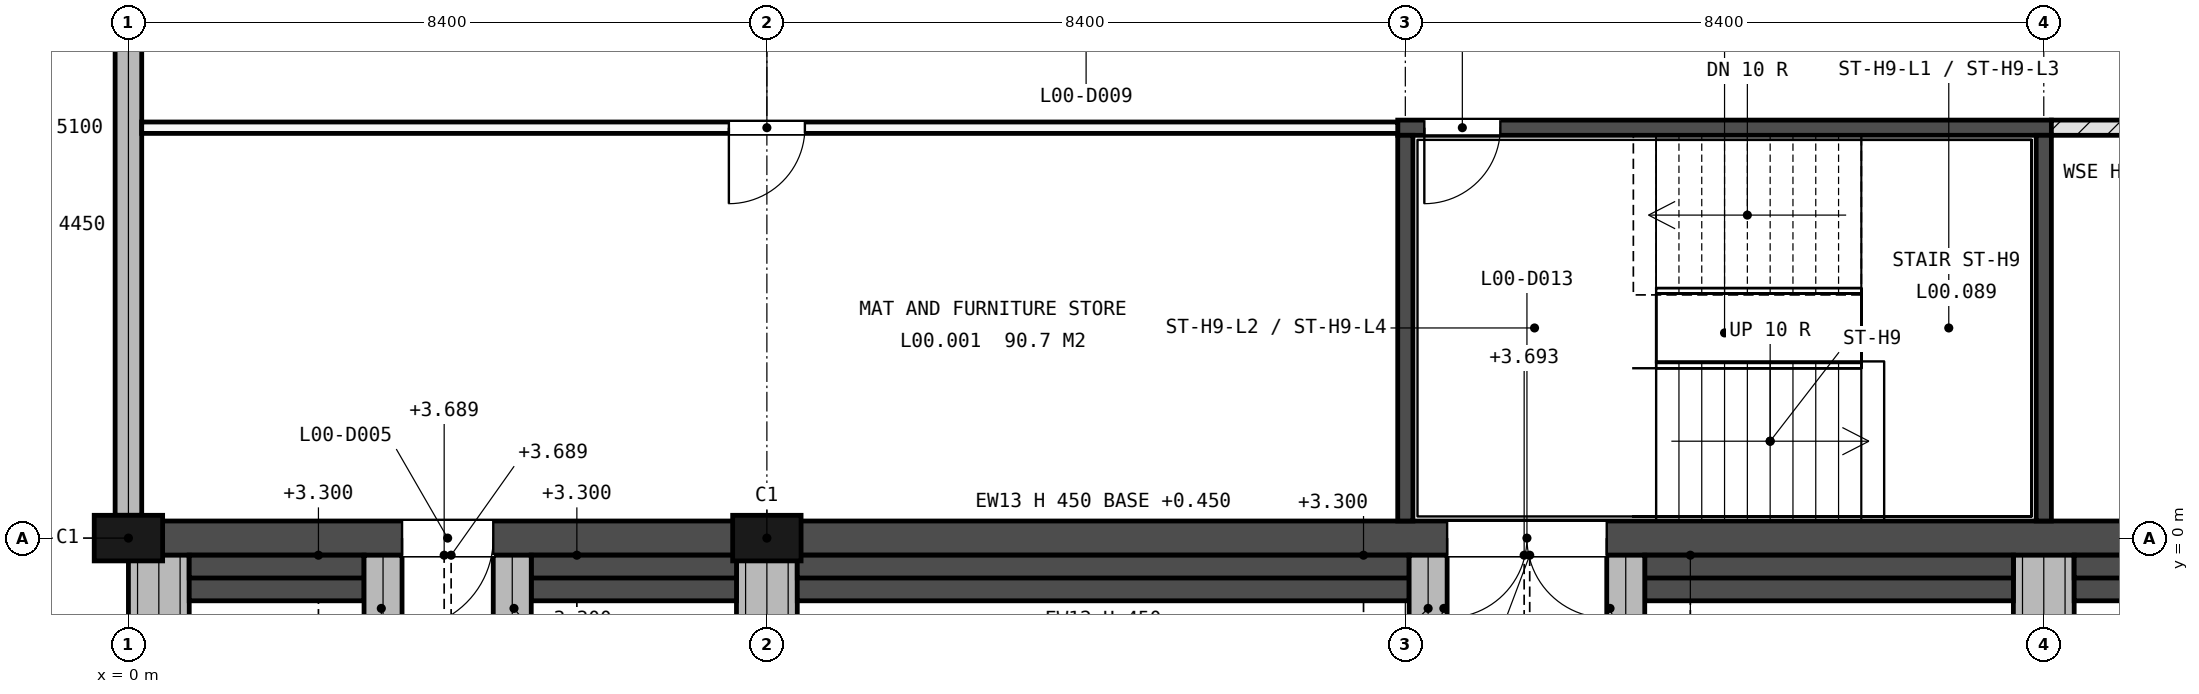
"""IFC4 building model, lengths in metres.
Left out: names, types, materials, properties, quantities, classifications, styles, units other than length and angle.
Written with IfcOpenShell. Run it as: python <this file> out.ifc"""

import sys

from ifc_helpers import new_model, si_unit, direction, frame, frame_2d, origin, origin_2d, place, context, subcontext, project, spatial, rectangle, extrude, element, fill, save


model = new_model("IFC4")
c1 = context("Model", 3, precision=1e-05, world=origin(), true_north=direction((0.0, 1.0)))
c2 = subcontext(c1, "Body", "Model", "MODEL_VIEW")
j1 = project(units=[si_unit("LENGTHUNIT", "METRE"), si_unit("PLANEANGLEUNIT", "RADIAN")], contexts=[c1])
p1 = place(None, origin())
s1 = spatial("IfcSite", under=j1, at=p1, CompositionType="ELEMENT")
p2 = place(p1, origin())
s2 = spatial("IfcBuilding", under=s1, at=p2, CompositionType="ELEMENT")
p3 = place(p2, origin())
s3 = spatial("IfcBuildingStorey", under=s2, at=p3, CompositionType="ELEMENT", Elevation=0.0)
for number, where, z_axis, x_axis in (
    (1, (0.0, 0.0, -0.3), (0.0, 0.0, 1.0), (1.0, 0.0, 0.0)),
    (2, (8.4, 0.0, -0.3), (0.0, 0.0, 1.0), (1.0, 0.0, 0.0)),
):
    element("IfcColumn", number, at=place(p3, frame(where, z_axis=z_axis, x_axis=x_axis)), inside=s3, PredefinedType="PILASTER", context=c2, shape_type="SweptSolid", body=[
        extrude(rectangle(XDim=0.9, YDim=0.6, at=origin_2d()), origin(), (0.0, 0.0, 1.0), 5.4),
    ])
p4 = place(p3, frame((0.0, 0.0, -0.3), z_axis=(0.0, 0.0, 1.0), x_axis=(1.0, 0.0, 0.0)))
e3 = element("IfcWall", 3, at=p4, inside=s3, PredefinedType="SOLIDWALL", context=c2, shape_type="SweptSolid", body=[
    extrude(rectangle(XDim=168.0, YDim=0.45, at=frame_2d((84.0, 0.0))), origin(), (0.0, 0.0, 1.0), 5.4),
])
p5 = place(p4, frame((34.8, 0.0, 2.7)))
e4 = element("IfcOpeningElement", 4, at=p5, cuts=e3, PredefinedType="OPENING", context=c2, shape_type="SweptSolid", body=[
    extrude(rectangle(XDim=1.8, YDim=1.2, at=frame_2d((0.9, 0.6))), frame((0.0, 0.235, 0.0), z_axis=(0.0, -1.0, 0.0), x_axis=(1.0, 0.0, 0.0)), (0.0, 0.0, 1.0), 0.47),
])
p6 = place(p4, frame((69.075, 0.0, 1.5)))
e5 = element("IfcOpeningElement", 5, at=p6, cuts=e3, PredefinedType="OPENING", context=c2, shape_type="SweptSolid", body=[
    extrude(rectangle(XDim=0.45, YDim=2.4, at=frame_2d((0.225, 1.2))), frame((0.0, 0.235, 0.0), z_axis=(0.0, -1.0, 0.0), x_axis=(1.0, 0.0, 0.0)), (0.0, 0.0, 1.0), 0.47),
])
p7 = place(p4, frame((73.275, 0.0, 1.5)))
e6 = element("IfcOpeningElement", 6, at=p7, cuts=e3, PredefinedType="OPENING", context=c2, shape_type="SweptSolid", body=[
    extrude(rectangle(XDim=0.45, YDim=2.4, at=frame_2d((0.225, 1.2))), frame((0.0, 0.235, 0.0), z_axis=(0.0, -1.0, 0.0), x_axis=(1.0, 0.0, 0.0)), (0.0, 0.0, 1.0), 0.47),
])
p8 = place(p4, frame((135.0, 0.0, 2.7)))
e7 = element("IfcOpeningElement", 7, at=p8, cuts=e3, PredefinedType="OPENING", context=c2, shape_type="SweptSolid", body=[
    extrude(rectangle(XDim=1.8, YDim=1.2, at=frame_2d((0.9, 0.6))), frame((0.0, 0.235, 0.0), z_axis=(0.0, -1.0, 0.0), x_axis=(1.0, 0.0, 0.0)), (0.0, 0.0, 1.0), 0.47),
])
p9 = place(p4, frame((144.0, 0.0, 2.7)))
e8 = element("IfcOpeningElement", 8, at=p9, cuts=e3, PredefinedType="OPENING", context=c2, shape_type="SweptSolid", body=[
    extrude(rectangle(XDim=1.8, YDim=1.2, at=frame_2d((0.9, 0.6))), frame((0.0, 0.235, 0.0), z_axis=(0.0, -1.0, 0.0), x_axis=(1.0, 0.0, 0.0)), (0.0, 0.0, 1.0), 0.47),
])
p10 = place(p4, frame((114.6, 0.0, 0.3), z_axis=(0.0, 0.0, 1.0), x_axis=(-1.0, 0.0, 0.0)))
e9 = element("IfcOpeningElement", 9, at=p10, cuts=e3, PredefinedType="OPENING", context=c2, shape_type="SweptSolid", body=[
    extrude(rectangle(XDim=2.1, YDim=2.2, at=frame_2d((1.05, 1.1))), frame((0.0, 0.235, 0.0), z_axis=(0.0, -1.0, 0.0), x_axis=(1.0, 0.0, 0.0)), (0.0, 0.0, 1.0), 0.47),
])
p11 = place(p4, frame((117.3, 0.0, 0.3), z_axis=(0.0, 0.0, 1.0), x_axis=(-1.0, 0.0, 0.0)))
e10 = element("IfcOpeningElement", 10, at=p11, cuts=e3, PredefinedType="OPENING", context=c2, shape_type="SweptSolid", body=[
    extrude(rectangle(XDim=2.1, YDim=2.2, at=frame_2d((1.05, 1.1))), frame((0.0, 0.235, 0.0), z_axis=(0.0, -1.0, 0.0), x_axis=(1.0, 0.0, 0.0)), (0.0, 0.0, 1.0), 0.47),
])
p12 = place(p4, frame((106.05, 0.0, 0.3), z_axis=(0.0, 0.0, 1.0), x_axis=(-1.0, 0.0, 0.0)))
e11 = element("IfcOpeningElement", 11, at=p12, cuts=e3, PredefinedType="OPENING", context=c2, shape_type="SweptSolid", body=[
    extrude(rectangle(XDim=2.1, YDim=2.2, at=frame_2d((1.05, 1.1))), frame((0.0, 0.235, 0.0), z_axis=(0.0, -1.0, 0.0), x_axis=(1.0, 0.0, 0.0)), (0.0, 0.0, 1.0), 0.47),
])
p13 = place(p4, frame((57.25, 0.0, 0.3), z_axis=(0.0, 0.0, 1.0), x_axis=(-1.0, 0.0, 0.0)))
e12 = element("IfcOpeningElement", 12, at=p13, cuts=e3, PredefinedType="OPENING", context=c2, shape_type="SweptSolid", body=[
    extrude(rectangle(XDim=2.1, YDim=2.2, at=frame_2d((1.05, 1.1))), frame((0.0, 0.235, 0.0), z_axis=(0.0, -1.0, 0.0), x_axis=(1.0, 0.0, 0.0)), (0.0, 0.0, 1.0), 0.47),
])
p14 = place(p4, frame((120.75, 0.0, 0.3), z_axis=(0.0, 0.0, 1.0), x_axis=(-1.0, 0.0, 0.0)))
e13 = element("IfcOpeningElement", 13, at=p14, cuts=e3, PredefinedType="OPENING", context=c2, shape_type="SweptSolid", body=[
    extrude(rectangle(XDim=2.1, YDim=2.2, at=frame_2d((1.05, 1.1))), frame((0.0, 0.235, 0.0), z_axis=(0.0, -1.0, 0.0), x_axis=(1.0, 0.0, 0.0)), (0.0, 0.0, 1.0), 0.47),
])
p15 = place(p4, frame((124.95, 0.0, 0.3), z_axis=(0.0, 0.0, 1.0), x_axis=(-1.0, 0.0, 0.0)))
e14 = element("IfcOpeningElement", 14, at=p15, cuts=e3, PredefinedType="OPENING", context=c2, shape_type="SweptSolid", body=[
    extrude(rectangle(XDim=2.1, YDim=2.2, at=frame_2d((1.05, 1.1))), frame((0.0, 0.235, 0.0), z_axis=(0.0, -1.0, 0.0), x_axis=(1.0, 0.0, 0.0)), (0.0, 0.0, 1.0), 0.47),
])
p16 = place(p4, frame((19.45, 0.0, 0.3), z_axis=(0.0, 0.0, 1.0), x_axis=(-1.0, 0.0, 0.0)))
e15 = element("IfcOpeningElement", 15, at=p16, cuts=e3, PredefinedType="OPENING", context=c2, shape_type="SweptSolid", body=[
    extrude(rectangle(XDim=2.1, YDim=2.2, at=frame_2d((1.05, 1.1))), frame((0.0, 0.235, 0.0), z_axis=(0.0, -1.0, 0.0), x_axis=(1.0, 0.0, 0.0)), (0.0, 0.0, 1.0), 0.47),
])
p17 = place(p4, frame((162.25, 0.0, 0.3), z_axis=(0.0, 0.0, 1.0), x_axis=(-1.0, 0.0, 0.0)))
e16 = element("IfcOpeningElement", 16, at=p17, cuts=e3, PredefinedType="OPENING", context=c2, shape_type="SweptSolid", body=[
    extrude(rectangle(XDim=2.1, YDim=2.2, at=frame_2d((1.05, 1.1))), frame((0.0, 0.235, 0.0), z_axis=(0.0, -1.0, 0.0), x_axis=(1.0, 0.0, 0.0)), (0.0, 0.0, 1.0), 0.47),
])
p18 = place(p4, frame((4.8, 0.0, 0.3), z_axis=(0.0, 0.0, 1.0), x_axis=(-1.0, 0.0, 0.0)))
e17 = element("IfcOpeningElement", 17, at=p18, cuts=e3, PredefinedType="OPENING", context=c2, shape_type="SweptSolid", body=[
    extrude(rectangle(XDim=1.2, YDim=2.2, at=frame_2d((0.6, 1.1))), frame((0.0, 0.235, 0.0), z_axis=(0.0, -1.0, 0.0), x_axis=(1.0, 0.0, 0.0)), (0.0, 0.0, 1.0), 0.47),
])
p19 = place(p4, frame((64.8, 0.0, 0.3), z_axis=(0.0, 0.0, 1.0), x_axis=(-1.0, 0.0, 0.0)))
e18 = element("IfcOpeningElement", 18, at=p19, cuts=e3, PredefinedType="OPENING", context=c2, shape_type="SweptSolid", body=[
    extrude(rectangle(XDim=1.2, YDim=2.2, at=frame_2d((0.6, 1.1))), frame((0.0, 0.235, 0.0), z_axis=(0.0, -1.0, 0.0), x_axis=(1.0, 0.0, 0.0)), (0.0, 0.0, 1.0), 0.47),
])
p20 = place(p4, frame((81.0, 0.0, 0.3), z_axis=(0.0, 0.0, 1.0), x_axis=(-1.0, 0.0, 0.0)))
e19 = element("IfcOpeningElement", 19, at=p20, cuts=e3, PredefinedType="OPENING", context=c2, shape_type="SweptSolid", body=[
    extrude(rectangle(XDim=2.4, YDim=2.4, at=frame_2d((1.2, 1.2))), frame((0.0, 0.235, 0.0), z_axis=(0.0, -1.0, 0.0), x_axis=(1.0, 0.0, 0.0)), (0.0, 0.0, 1.0), 0.47),
])
p21 = place(p4, frame((97.8, 0.0, 0.3), z_axis=(0.0, 0.0, 1.0), x_axis=(-1.0, 0.0, 0.0)))
e20 = element("IfcOpeningElement", 20, at=p21, cuts=e3, PredefinedType="OPENING", context=c2, shape_type="SweptSolid", body=[
    extrude(rectangle(XDim=2.4, YDim=2.4, at=frame_2d((1.2, 1.2))), frame((0.0, 0.235, 0.0), z_axis=(0.0, -1.0, 0.0), x_axis=(1.0, 0.0, 0.0)), (0.0, 0.0, 1.0), 0.47),
])
p22 = place(p4, frame((139.8, 0.0, 0.3), z_axis=(0.0, 0.0, 1.0), x_axis=(-1.0, 0.0, 0.0)))
e21 = element("IfcOpeningElement", 21, at=p22, cuts=e3, PredefinedType="OPENING", context=c2, shape_type="SweptSolid", body=[
    extrude(rectangle(XDim=2.4, YDim=2.1, at=frame_2d((1.2, 1.05))), frame((0.0, 0.235, 0.0), z_axis=(0.0, -1.0, 0.0), x_axis=(1.0, 0.0, 0.0)), (0.0, 0.0, 1.0), 0.47),
])
p23 = place(p4, frame((156.3, 0.0, 0.3), z_axis=(0.0, 0.0, 1.0), x_axis=(-1.0, 0.0, 0.0)))
e22 = element("IfcOpeningElement", 22, at=p23, cuts=e3, PredefinedType="OPENING", context=c2, shape_type="SweptSolid", body=[
    extrude(rectangle(XDim=1.8, YDim=2.2, at=frame_2d((0.9, 1.1))), frame((0.0, 0.235, 0.0), z_axis=(0.0, -1.0, 0.0), x_axis=(1.0, 0.0, 0.0)), (0.0, 0.0, 1.0), 0.47),
])
p24 = place(p3, frame((0.0, 0.3, 0.0), z_axis=(0.0, 0.0, 1.0), x_axis=(0.0, 1.0, 0.0)))
e23 = element("IfcWall", 23, at=p24, inside=s3, PredefinedType="STANDARD", context=c2, shape_type="SweptSolid", body=[
    extrude(rectangle(XDim=7.65, YDim=0.35, at=frame_2d((3.825, 0.0))), origin(), (0.0, 0.0, 1.0), 4.45),
])
for number, where, z_axis, x_axis in (
    (24, (0.4, -0.225, 0.0), (0.0, 0.0, 1.0), (0.0, -1.0, 0.0)),
    (25, (8.4, -0.225, 0.0), (0.0, 0.0, 1.0), (0.0, -1.0, 0.0)),
    (26, (25.2, -0.225, 0.0), (0.0, 0.0, 1.0), (0.0, -1.0, 0.0)),
):
    element("IfcWall", number, at=place(p3, frame(where, z_axis=z_axis, x_axis=x_axis)), inside=s3, PredefinedType="SOLIDWALL", context=c2, shape_type="SweptSolid", body=[
        extrude(rectangle(XDim=0.9, YDim=0.8, at=frame_2d((0.45, 0.0))), origin(), (0.0, 0.0, 1.0), 5.1),
    ])
p25 = place(p3, frame((0.8, -0.525, 0.0), z_axis=(0.0, 0.0, 1.0), x_axis=(1.0, 0.0, 0.0)))
e27 = element("IfcWall", 27, at=p25, inside=s3, PredefinedType="SOLIDWALL", context=c2, shape_type="SweptSolid", body=[
    extrude(rectangle(XDim=2.3, YDim=0.6, at=frame_2d((1.15, 0.0))), origin(), (0.0, 0.0, 1.0), 0.45),
])
p26 = place(p3, frame((0.8, -0.375, 0.45), z_axis=(0.0, 0.0, 1.0), x_axis=(1.0, 0.0, 0.0)))
e28 = element("IfcWall", 28, at=p26, inside=s3, PredefinedType="SOLIDWALL", context=c2, shape_type="SweptSolid", body=[
    extrude(rectangle(XDim=2.3, YDim=0.3, at=frame_2d((1.15, 0.0))), origin(), (0.0, 0.0, 1.0), 0.45),
])
p27 = place(p3, frame((5.3, -0.525, 0.0), z_axis=(0.0, 0.0, 1.0), x_axis=(1.0, 0.0, 0.0)))
e29 = element("IfcWall", 29, at=p27, inside=s3, PredefinedType="SOLIDWALL", context=c2, shape_type="SweptSolid", body=[
    extrude(rectangle(XDim=2.7, YDim=0.6, at=frame_2d((1.35, 0.0))), origin(), (0.0, 0.0, 1.0), 0.45),
])
p28 = place(p3, frame((5.3, -0.375, 0.45), z_axis=(0.0, 0.0, 1.0), x_axis=(1.0, 0.0, 0.0)))
e30 = element("IfcWall", 30, at=p28, inside=s3, PredefinedType="SOLIDWALL", context=c2, shape_type="SweptSolid", body=[
    extrude(rectangle(XDim=2.7, YDim=0.3, at=frame_2d((1.35, 0.0))), origin(), (0.0, 0.0, 1.0), 0.45),
])
p29 = place(p3, frame((8.8, -0.525, 0.0), z_axis=(0.0, 0.0, 1.0), x_axis=(1.0, 0.0, 0.0)))
e31 = element("IfcWall", 31, at=p29, inside=s3, PredefinedType="SOLIDWALL", context=c2, shape_type="SweptSolid", body=[
    extrude(rectangle(XDim=8.05, YDim=0.6, at=frame_2d((4.025, 0.0))), origin(), (0.0, 0.0, 1.0), 0.45),
])
p30 = place(p3, frame((8.8, -0.375, 0.45), z_axis=(0.0, 0.0, 1.0), x_axis=(1.0, 0.0, 0.0)))
e32 = element("IfcWall", 32, at=p30, inside=s3, PredefinedType="SOLIDWALL", context=c2, shape_type="SweptSolid", body=[
    extrude(rectangle(XDim=8.05, YDim=0.3, at=frame_2d((4.025, 0.0))), origin(), (0.0, 0.0, 1.0), 0.45),
])
p31 = place(p3, frame((19.95, -0.525, 0.0), z_axis=(0.0, 0.0, 1.0), x_axis=(1.0, 0.0, 0.0)))
e33 = element("IfcWall", 33, at=p31, inside=s3, PredefinedType="SOLIDWALL", context=c2, shape_type="SweptSolid", body=[
    extrude(rectangle(XDim=4.85, YDim=0.6, at=frame_2d((2.425, 0.0))), origin(), (0.0, 0.0, 1.0), 0.45),
])
p32 = place(p3, frame((19.95, -0.375, 0.45), z_axis=(0.0, 0.0, 1.0), x_axis=(1.0, 0.0, 0.0)))
e34 = element("IfcWall", 34, at=p32, inside=s3, PredefinedType="SOLIDWALL", context=c2, shape_type="SweptSolid", body=[
    extrude(rectangle(XDim=4.85, YDim=0.3, at=frame_2d((2.425, 0.0))), origin(), (0.0, 0.0, 1.0), 0.45),
])
p33 = place(p3, frame((25.6, -0.525, 0.0), z_axis=(0.0, 0.0, 1.0), x_axis=(1.0, 0.0, 0.0)))
e35 = element("IfcWall", 35, at=p33, inside=s3, PredefinedType="SOLIDWALL", context=c2, shape_type="SweptSolid", body=[
    extrude(rectangle(XDim=7.6, YDim=0.6, at=frame_2d((3.8, 0.0))), origin(), (0.0, 0.0, 1.0), 0.45),
])
p34 = place(p3, frame((25.6, -0.375, 0.45), z_axis=(0.0, 0.0, 1.0), x_axis=(1.0, 0.0, 0.0)))
e36 = element("IfcWall", 36, at=p34, inside=s3, PredefinedType="SOLIDWALL", context=c2, shape_type="SweptSolid", body=[
    extrude(rectangle(XDim=7.6, YDim=0.3, at=frame_2d((3.8, 0.0))), origin(), (0.0, 0.0, 1.0), 0.45),
])
for number, where, z_axis, x_axis in (
    (37, (3.35, -0.225, 0.0), (0.0, 0.0, 1.0), (0.0, -1.0, 0.0)),
    (38, (5.05, -0.225, 0.0), (0.0, 0.0, 1.0), (0.0, -1.0, 0.0)),
    (39, (17.1, -0.225, 0.0), (0.0, 0.0, 1.0), (0.0, -1.0, 0.0)),
    (40, (19.7, -0.225, 0.0), (0.0, 0.0, 1.0), (0.0, -1.0, 0.0)),
):
    element("IfcWall", number, at=place(p3, frame(where, z_axis=z_axis, x_axis=x_axis)), inside=s3, PredefinedType="SOLIDWALL", context=c2, shape_type="SweptSolid", body=[
        extrude(rectangle(XDim=1.4, YDim=0.5, at=frame_2d((0.7, 0.0))), origin(), (0.0, 0.0, 1.0), 3.08),
    ])
p35 = place(p3, frame((16.7, 5.4, 0.0), z_axis=(0.0, 0.0, 1.0), x_axis=(1.0, 0.0, 0.0)))
e41 = element("IfcWall", 41, at=p35, inside=s3, PredefinedType="SHEAR", context=c2, shape_type="SweptSolid", body=[
    extrude(rectangle(XDim=8.6, YDim=0.2, at=frame_2d((4.3, 0.0))), origin(), (0.0, 0.0, 1.0), 5.1),
])
p36 = place(p35, frame((0.35, 0.0, 0.0)))
e42 = element("IfcOpeningElement", 42, at=p36, cuts=e41, PredefinedType="OPENING", context=c2, shape_type="SweptSolid", body=[
    extrude(rectangle(XDim=1.0, YDim=2.1, at=frame_2d((0.5, 1.05))), frame((0.0, 0.11, 0.0), z_axis=(0.0, -1.0, 0.0), x_axis=(1.0, 0.0, 0.0)), (0.0, 0.0, 1.0), 0.22),
])
for number, where, z_axis, x_axis in (
    (43, (16.8, 0.225, 0.0), (0.0, 0.0, 1.0), (0.0, 1.0, 0.0)),
    (44, (25.2, 0.225, 0.0), (0.0, 0.0, 1.0), (0.0, 1.0, 0.0)),
):
    element("IfcWall", number, at=place(p3, frame(where, z_axis=z_axis, x_axis=x_axis)), inside=s3, PredefinedType="SHEAR", context=c2, shape_type="SweptSolid", body=[
        extrude(rectangle(XDim=5.075, YDim=0.2, at=frame_2d((2.538, 0.0))), origin(), (0.0, 0.0, 1.0), 5.1),
    ])
p37 = place(p3, frame((0.175, 5.4, 0.0), z_axis=(0.0, 0.0, 1.0), x_axis=(1.0, 0.0, 0.0)))
e45 = element("IfcWall", 45, at=p37, inside=s3, PredefinedType="PARTITIONING", context=c2, shape_type="SweptSolid", body=[
    extrude(rectangle(XDim=16.525, YDim=0.15, at=frame_2d((8.262, 0.0))), origin(), (0.0, 0.0, 1.0), 5.1),
])
p38 = place(p37, frame((7.725, 0.0, 0.0)))
e46 = element("IfcOpeningElement", 46, at=p38, cuts=e45, PredefinedType="OPENING", context=c2, shape_type="SweptSolid", body=[
    extrude(rectangle(XDim=1.0, YDim=2.1, at=frame_2d((0.5, 1.05))), frame((0.0, 0.085, 0.0), z_axis=(0.0, -1.0, 0.0), x_axis=(1.0, 0.0, 0.0)), (0.0, 0.0, 1.0), 0.17),
])
p39 = place(p3, frame((25.3, 5.4, 0.0), z_axis=(0.0, 0.0, 1.0), x_axis=(1.0, 0.0, 0.0)))
e47 = element("IfcWall", 47, at=p39, inside=s3, PredefinedType="SOLIDWALL", context=c2, shape_type="SweptSolid", body=[
    extrude(rectangle(XDim=16.7, YDim=0.2, at=frame_2d((8.35, 0.0))), origin(), (0.0, 0.0, 1.0), 5.1),
])
p40 = place(p39, frame((7.7, 0.0, 0.0)))
e48 = element("IfcOpeningElement", 48, at=p40, cuts=e47, PredefinedType="OPENING", context=c2, shape_type="SweptSolid", body=[
    extrude(rectangle(XDim=1.2, YDim=2.4, at=frame_2d((0.6, 1.2))), frame((0.0, 0.11, 0.0), z_axis=(0.0, -1.0, 0.0), x_axis=(1.0, 0.0, 0.0)), (0.0, 0.0, 1.0), 0.22),
])
p41 = place(p16, origin())
e49 = element("IfcDoor", 49, at=p41, inside=s3, OperationType="SINGLE_SWING_LEFT", PredefinedType="DOOR", context=c2, shape_type="SweptSolid", body=[
    extrude(rectangle(XDim=2.1, YDim=0.013, at=frame_2d((1.05, 0.007))), frame((0.0, 0.115, 0.0), z_axis=(0.0, -1.0, 0.0), x_axis=(1.0, 0.0, 0.0)), (0.0, 0.0, 1.0), 0.23),
    extrude(rectangle(XDim=0.075, YDim=2.112, at=frame_2d((0.038, 1.069))), frame((0.0, 0.125, 0.0), z_axis=(0.0, -1.0, 0.0), x_axis=(1.0, 0.0, 0.0)), (0.0, 0.0, 1.0), 0.25),
    extrude(rectangle(XDim=0.075, YDim=2.112, at=frame_2d((2.062, 1.069))), frame((0.0, 0.125, 0.0), z_axis=(0.0, -1.0, 0.0), x_axis=(1.0, 0.0, 0.0)), (0.0, 0.0, 1.0), 0.25),
    extrude(rectangle(XDim=2.1, YDim=0.075, at=frame_2d((1.05, 2.163))), frame((0.0, 0.115, 0.0), z_axis=(0.0, -1.0, 0.0), x_axis=(1.0, 0.0, 0.0)), (0.0, 0.0, 1.0), 0.23),
    extrude(rectangle(XDim=1.95, YDim=2.112, at=frame_2d((1.05, 1.069))), frame((0.0, 0.025, 0.0), z_axis=(0.0, -1.0, 0.0), x_axis=(1.0, 0.0, 0.0)), (0.0, 0.0, 1.0), 0.05),
])
fill(e15, e49)
p42 = place(p18, origin())
e50 = element("IfcDoor", 50, at=p42, inside=s3, OperationType="SINGLE_SWING_LEFT", PredefinedType="DOOR", context=c2, shape_type="SweptSolid", body=[
    extrude(rectangle(XDim=1.2, YDim=0.013, at=frame_2d((0.6, 0.007))), frame((0.0, 0.115, 0.0), z_axis=(0.0, -1.0, 0.0), x_axis=(1.0, 0.0, 0.0)), (0.0, 0.0, 1.0), 0.23),
    extrude(rectangle(XDim=0.06, YDim=2.127, at=frame_2d((0.03, 1.076))), frame((0.0, 0.125, 0.0), z_axis=(0.0, -1.0, 0.0), x_axis=(1.0, 0.0, 0.0)), (0.0, 0.0, 1.0), 0.25),
    extrude(rectangle(XDim=0.06, YDim=2.127, at=frame_2d((1.17, 1.076))), frame((0.0, 0.125, 0.0), z_axis=(0.0, -1.0, 0.0), x_axis=(1.0, 0.0, 0.0)), (0.0, 0.0, 1.0), 0.25),
    extrude(rectangle(XDim=1.2, YDim=0.06, at=frame_2d((0.6, 2.17))), frame((0.0, 0.115, 0.0), z_axis=(0.0, -1.0, 0.0), x_axis=(1.0, 0.0, 0.0)), (0.0, 0.0, 1.0), 0.23),
    extrude(rectangle(XDim=1.08, YDim=2.127, at=frame_2d((0.6, 1.076))), frame((0.0, 0.025, 0.0), z_axis=(0.0, -1.0, 0.0), x_axis=(1.0, 0.0, 0.0)), (0.0, 0.0, 1.0), 0.05),
])
fill(e17, e50)
p43 = place(p36, origin())
e51 = element("IfcDoor", 51, at=p43, inside=s3, OperationType="SINGLE_SWING_LEFT", PredefinedType="DOOR", context=c2, shape_type="SweptSolid", body=[
    extrude(rectangle(XDim=1.0, YDim=2.1, at=frame_2d((0.5, 1.05))), frame((0.0, 0.025, 0.0), z_axis=(0.0, -1.0, 0.0), x_axis=(1.0, 0.0, 0.0)), (0.0, 0.0, 1.0), 0.05),
])
fill(e42, e51)
p44 = place(p38, origin())
e52 = element("IfcDoor", 52, at=p44, inside=s3, OperationType="SINGLE_SWING_LEFT", PredefinedType="DOOR", context=c2, shape_type="SweptSolid", body=[
    extrude(rectangle(XDim=1.0, YDim=2.1, at=frame_2d((0.5, 1.05))), frame((0.0, 0.025, 0.0), z_axis=(0.0, -1.0, 0.0), x_axis=(1.0, 0.0, 0.0)), (0.0, 0.0, 1.0), 0.05),
])
fill(e46, e52)
save(model, sys.argv[1])
